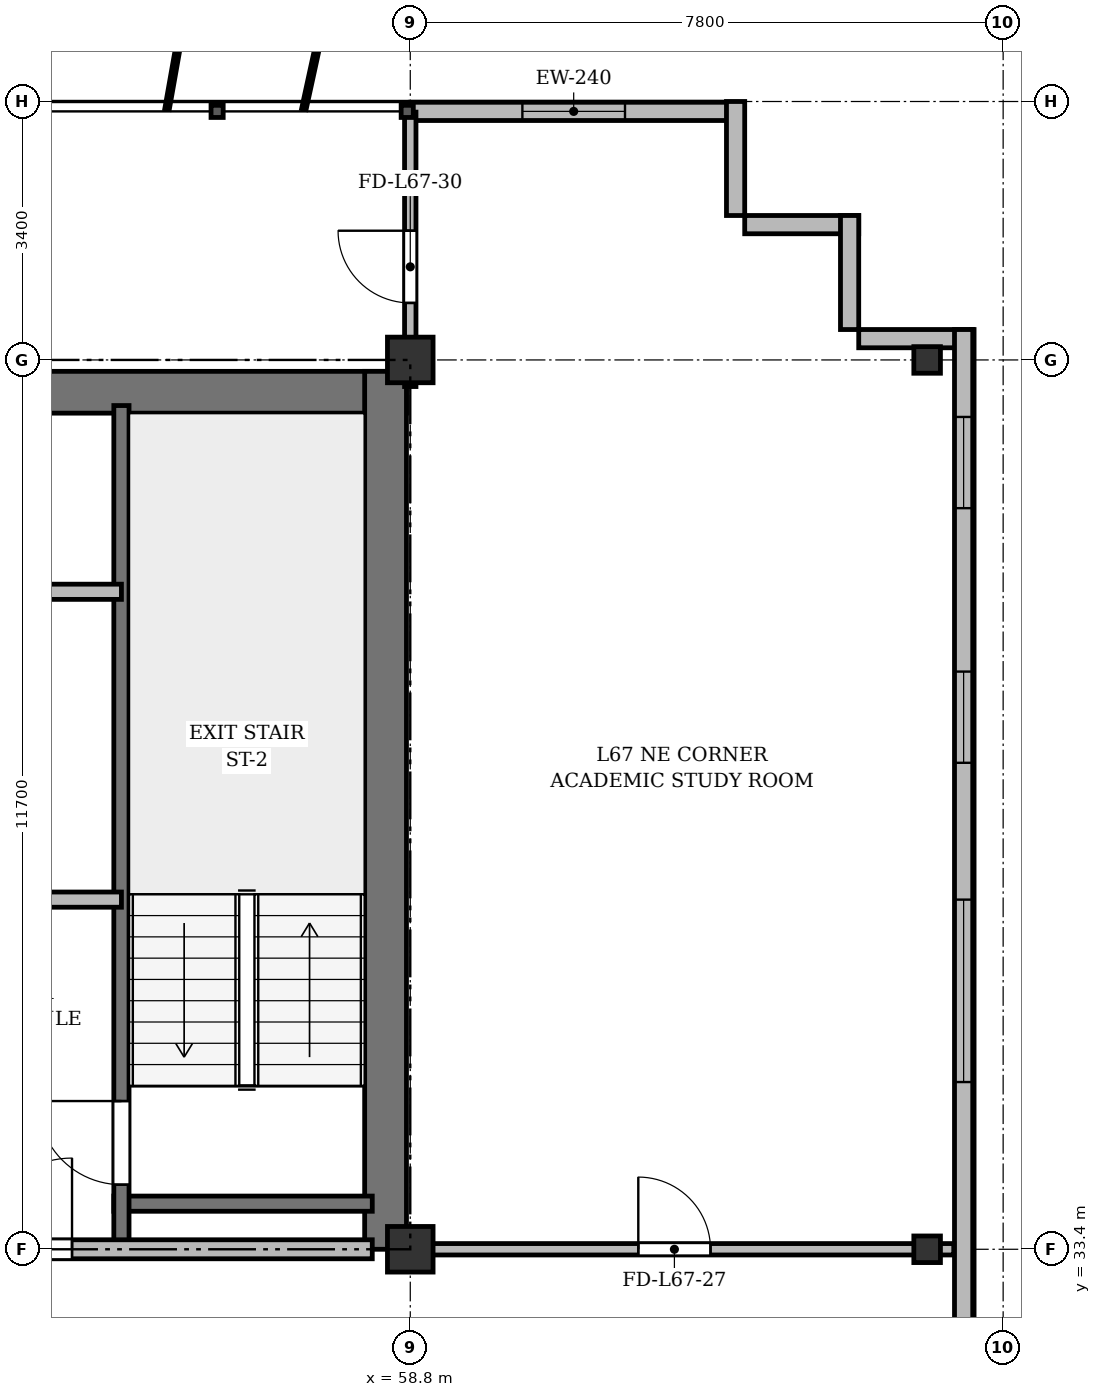
"""IFC4 building model, lengths in metres.
Left out: names, types, materials, properties, quantities, classifications, styles, units other than length and angle.
Written with IfcOpenShell. Run it as: python <this file> out.ifc"""

import sys

from ifc_helpers import new_model, si_unit, direction, frame, frame_2d, origin, origin_2d, place, context, subcontext, project, spatial, rectangle, i_section, extrude, source, transform, mapped, element, fill, save


model = new_model("IFC4")
c1 = context("Model", 3, precision=1e-05, world=origin(), true_north=direction((0.0, 1.0)))
c2 = subcontext(c1, "Body", "Model", "MODEL_VIEW")
j1 = project(units=[si_unit("LENGTHUNIT", "METRE"), si_unit("PLANEANGLEUNIT", "RADIAN")], contexts=[c1])
p1 = place(None, origin())
s1 = spatial("IfcSite", under=j1, at=p1, CompositionType="ELEMENT")
p2 = place(p1, origin())
s2 = spatial("IfcBuilding", under=s1, at=p2, CompositionType="ELEMENT")
p3 = place(p2, frame((0.0, 0.0, 259.5)))
s3 = spatial("IfcBuildingStorey", under=s2, at=p3, CompositionType="ELEMENT", Elevation=259.5)
m1 = source(origin(), c2, "Body", "SweptSolid", [
    extrude(rectangle(XDim=0.6, YDim=0.6, at=origin_2d()), origin(), (0.0, 0.0, 1.0), 3.6),
])
for number, where, z_axis, x_axis in (
    (1, (58.8, 33.4, 0.0), (0.0, 0.0, 1.0), (1.0, 0.0, 0.0)),
    (2, (58.8, 45.1, 0.0), (0.0, 0.0, 1.0), (1.0, 0.0, 0.0)),
):
    element("IfcColumn", number, at=place(p3, frame(where, z_axis=z_axis, x_axis=x_axis)), inside=s3, PredefinedType="COLUMN", context=c2, shape_type="MappedRepresentation", body=[
        mapped(m1, transform((0.0, 0.0, 0.0), x_axis=(1.0, 0.0, 0.0), y_axis=(0.0, 1.0, 0.0), z_axis=(0.0, 0.0, 1.0), scale=1.0)),
    ])
m2 = source(origin(), c2, "Body", "SweptSolid", [
    extrude(i_section(OverallWidth=0.35, OverallDepth=0.35, WebThickness=0.018, FlangeThickness=0.028, at=origin_2d()), origin(), (0.0, 0.0, 1.0), 3.6),
])
for number, where, z_axis, x_axis in (
    (3, (65.6, 33.4, 0.0), (0.0, 0.0, 1.0), (1.0, 0.0, 0.0)),
    (4, (65.6, 45.1, 0.0), (0.0, 0.0, 1.0), (1.0, 0.0, 0.0)),
):
    element("IfcColumn", number, at=place(p3, frame(where, z_axis=z_axis, x_axis=x_axis)), inside=s3, PredefinedType="COLUMN", context=c2, shape_type="MappedRepresentation", body=[
        mapped(m2, transform((0.0, 0.0, 0.0), x_axis=(1.0, 0.0, 0.0), y_axis=(0.0, 1.0, 0.0), z_axis=(0.0, 0.0, 1.0), scale=1.0)),
    ])
p4 = place(p3, frame((58.8, 48.37, 0.0), z_axis=(0.0, 0.0, 1.0), x_axis=(1.0, 0.0, 0.0)))
e5 = element("IfcWall", 5, at=p4, inside=s3, PredefinedType="SOLIDWALL", context=c2, shape_type="SweptSolid", body=[
    extrude(rectangle(XDim=4.3, YDim=0.24, at=frame_2d((2.15, 0.0))), origin(), (0.0, 0.0, 1.0), 3.37),
])
p5 = place(p4, frame((1.475, 0.0, 0.9)))
e6 = element("IfcOpeningElement", 6, at=p5, cuts=e5, PredefinedType="OPENING", context=c2, shape_type="SweptSolid", body=[
    extrude(rectangle(XDim=1.35, YDim=1.5, at=frame_2d((0.675, 0.75))), frame((0.0, 0.13, 0.0), z_axis=(0.0, -1.0, 0.0), x_axis=(1.0, 0.0, 0.0)), (0.0, 0.0, 1.0), 0.26),
])
for number, where, z_axis, x_axis in (
    (7, (63.08, 48.5, 0.0), (0.0, 0.0, 1.0), (0.0, -1.0, 0.0)),
    (8, (63.2, 46.88, 0.0), (0.0, 0.0, 1.0), (1.0, 0.0, 0.0)),
    (9, (64.58, 47.0, 0.0), (0.0, 0.0, 1.0), (0.0, -1.0, 0.0)),
    (10, (64.7, 45.38, 0.0), (0.0, 0.0, 1.0), (1.0, 0.0, 0.0)),
):
    element("IfcWall", number, at=place(p3, frame(where, z_axis=z_axis, x_axis=x_axis)), inside=s3, PredefinedType="SOLIDWALL", context=c2, shape_type="SweptSolid", body=[
        extrude(rectangle(XDim=1.5, YDim=0.24, at=frame_2d((0.75, 0.0))), origin(), (0.0, 0.0, 1.0), 3.37),
    ])
p6 = place(p3, frame((66.08, 45.5, 0.0), z_axis=(0.0, 0.0, 1.0), x_axis=(0.0, -1.0, 0.0)))
e11 = element("IfcWall", 11, at=p6, inside=s3, PredefinedType="SOLIDWALL", context=c2, shape_type="SweptSolid", body=[
    extrude(rectangle(XDim=39.0, YDim=0.24, at=frame_2d((19.5, 0.0))), origin(), (0.0, 0.0, 1.0), 3.37),
])
p7 = place(p6, frame((36.35, 0.0, 0.92)))
e12 = element("IfcOpeningElement", 12, at=p7, cuts=e11, PredefinedType="OPENING", context=c2, shape_type="SweptSolid", body=[
    extrude(rectangle(XDim=1.2, YDim=1.65, at=frame_2d((0.6, 0.825))), frame((0.0, 0.13, 0.0), z_axis=(0.0, -1.0, 0.0), x_axis=(1.0, 0.0, 0.0)), (0.0, 0.0, 1.0), 0.26),
])
p8 = place(p6, frame((32.9, 0.0, 0.92)))
e13 = element("IfcOpeningElement", 13, at=p8, cuts=e11, PredefinedType="OPENING", context=c2, shape_type="SweptSolid", body=[
    extrude(rectangle(XDim=2.4, YDim=2.1, at=frame_2d((1.2, 1.05))), frame((0.0, 0.13, 0.0), z_axis=(0.0, -1.0, 0.0), x_axis=(1.0, 0.0, 0.0)), (0.0, 0.0, 1.0), 0.26),
])
p9 = place(p6, frame((28.7, 0.0, 0.92)))
e14 = element("IfcOpeningElement", 14, at=p9, cuts=e11, PredefinedType="OPENING", context=c2, shape_type="SweptSolid", body=[
    extrude(rectangle(XDim=2.4, YDim=2.1, at=frame_2d((1.2, 1.05))), frame((0.0, 0.13, 0.0), z_axis=(0.0, -1.0, 0.0), x_axis=(1.0, 0.0, 0.0)), (0.0, 0.0, 1.0), 0.26),
])
p10 = place(p6, frame((21.5, 0.0, 0.92)))
e15 = element("IfcOpeningElement", 15, at=p10, cuts=e11, PredefinedType="OPENING", context=c2, shape_type="SweptSolid", body=[
    extrude(rectangle(XDim=2.4, YDim=2.1, at=frame_2d((1.2, 1.05))), frame((0.0, 0.13, 0.0), z_axis=(0.0, -1.0, 0.0), x_axis=(1.0, 0.0, 0.0)), (0.0, 0.0, 1.0), 0.26),
])
p11 = place(p6, frame((7.5, 0.0, 0.92)))
e16 = element("IfcOpeningElement", 16, at=p11, cuts=e11, PredefinedType="OPENING", context=c2, shape_type="SweptSolid", body=[
    extrude(rectangle(XDim=2.4, YDim=2.1, at=frame_2d((1.2, 1.05))), frame((0.0, 0.13, 0.0), z_axis=(0.0, -1.0, 0.0), x_axis=(1.0, 0.0, 0.0)), (0.0, 0.0, 1.0), 0.26),
])
p12 = place(p6, frame((4.5, 0.0, 0.92)))
e17 = element("IfcOpeningElement", 17, at=p12, cuts=e11, PredefinedType="OPENING", context=c2, shape_type="SweptSolid", body=[
    extrude(rectangle(XDim=1.2, YDim=1.65, at=frame_2d((0.6, 0.825))), frame((0.0, 0.13, 0.0), z_axis=(0.0, -1.0, 0.0), x_axis=(1.0, 0.0, 0.0)), (0.0, 0.0, 1.0), 0.26),
])
p13 = place(p6, frame((1.15, 0.0, 0.92)))
e18 = element("IfcOpeningElement", 18, at=p13, cuts=e11, PredefinedType="OPENING", context=c2, shape_type="SweptSolid", body=[
    extrude(rectangle(XDim=1.2, YDim=1.65, at=frame_2d((0.6, 0.825))), frame((0.0, 0.13, 0.0), z_axis=(0.0, -1.0, 0.0), x_axis=(1.0, 0.0, 0.0)), (0.0, 0.0, 1.0), 0.26),
])
p14 = place(p3, frame((15.65, 44.675, 0.0), z_axis=(0.0, 0.0, 1.0), x_axis=(1.0, 0.0, 0.0)))
e19 = element("IfcWall", 19, at=p14, inside=s3, PredefinedType="SHEAR", context=c2, shape_type="SweptSolid", body=[
    extrude(rectangle(XDim=43.1, YDim=0.55, at=frame_2d((21.55, 0.0))), origin(), (0.0, 0.0, 1.0), 3.37),
])
p15 = place(p3, frame((58.475, 33.4, 0.0), z_axis=(0.0, 0.0, 1.0), x_axis=(0.0, 1.0, 0.0)))
e20 = element("IfcWall", 20, at=p15, inside=s3, PredefinedType="SHEAR", context=c2, shape_type="SweptSolid", body=[
    extrude(rectangle(XDim=11.55, YDim=0.55, at=frame_2d((5.775, 0.0))), origin(), (0.0, 0.0, 1.0), 3.37),
])
p16 = place(p3, frame((54.9, 34.0, 0.0), z_axis=(0.0, 0.0, 1.0), x_axis=(1.0, 0.0, 0.0)))
e21 = element("IfcWall", 21, at=p16, inside=s3, PredefinedType="SHEAR", context=c2, shape_type="SweptSolid", body=[
    extrude(rectangle(XDim=3.4, YDim=0.2, at=frame_2d((1.7, 0.0))), origin(), (0.0, 0.0, 1.0), 3.37),
])
p17 = place(p3, frame((55.0, 33.4, 0.0), z_axis=(0.0, 0.0, 1.0), x_axis=(0.0, 1.0, 0.0)))
e22 = element("IfcWall", 22, at=p17, inside=s3, PredefinedType="SHEAR", context=c2, shape_type="SweptSolid", body=[
    extrude(rectangle(XDim=11.1, YDim=0.2, at=frame_2d((5.55, 0.0))), origin(), (0.0, 0.0, 1.0), 3.37),
])
p18 = place(p17, frame((0.85, 0.0, 0.0)))
e23 = element("IfcOpeningElement", 23, at=p18, cuts=e22, PredefinedType="OPENING", context=c2, shape_type="SweptSolid", body=[
    extrude(rectangle(XDim=1.1, YDim=2.15, at=frame_2d((0.55, 1.075))), frame((0.0, 0.11, 0.0), z_axis=(0.0, -1.0, 0.0), x_axis=(1.0, 0.0, 0.0)), (0.0, 0.0, 1.0), 0.22),
])
p19 = place(p3, frame((47.15, 42.05, 0.0), z_axis=(0.0, 0.0, 1.0), x_axis=(1.0, 0.0, 0.0)))
e24 = element("IfcWall", 24, at=p19, inside=s3, PredefinedType="SOLIDWALL", context=c2, shape_type="SweptSolid", body=[
    extrude(rectangle(XDim=7.85, YDim=0.2, at=frame_2d((3.925, 0.0))), origin(), (0.0, 0.0, 1.0), 2.87),
])
p20 = place(p19, frame((0.75, 0.0, 0.0)))
e25 = element("IfcOpeningElement", 25, at=p20, cuts=e24, PredefinedType="OPENING", context=c2, shape_type="SweptSolid", body=[
    extrude(rectangle(XDim=0.9, YDim=2.1, at=frame_2d((0.45, 1.05))), frame((0.0, 0.11, 0.0), z_axis=(0.0, -1.0, 0.0), x_axis=(1.0, 0.0, 0.0)), (0.0, 0.0, 1.0), 0.22),
])
p21 = place(p19, frame((3.85, 0.0, 0.0)))
e26 = element("IfcOpeningElement", 26, at=p21, cuts=e24, PredefinedType="OPENING", context=c2, shape_type="SweptSolid", body=[
    extrude(rectangle(XDim=0.9, YDim=2.1, at=frame_2d((0.45, 1.05))), frame((0.0, 0.11, 0.0), z_axis=(0.0, -1.0, 0.0), x_axis=(1.0, 0.0, 0.0)), (0.0, 0.0, 1.0), 0.22),
])
p22 = place(p3, frame((52.45, 38.0, 0.0), z_axis=(0.0, 0.0, 1.0), x_axis=(1.0, 0.0, 0.0)))
e27 = element("IfcWall", 27, at=p22, inside=s3, PredefinedType="PARTITIONING", context=c2, shape_type="SweptSolid", body=[
    extrude(rectangle(XDim=2.55, YDim=0.2, at=frame_2d((1.275, 0.0))), origin(), (0.0, 0.0, 1.0), 3.37),
])
p23 = place(p3, frame((47.15, 33.4, 0.0), z_axis=(0.0, 0.0, 1.0), x_axis=(1.0, 0.0, 0.0)))
e28 = element("IfcWall", 28, at=p23, inside=s3, PredefinedType="PARTITIONING", context=c2, shape_type="SweptSolid", body=[
    extrude(rectangle(XDim=11.15, YDim=0.25, at=frame_2d((5.575, 0.0))), origin(), (0.0, 0.0, 1.0), 2.92),
])
p24 = place(p23, frame((0.7, 0.0, 0.0)))
e29 = element("IfcOpeningElement", 29, at=p24, cuts=e28, PredefinedType="OPENING", context=c2, shape_type="SweptSolid", body=[
    extrude(rectangle(XDim=0.95, YDim=2.15, at=frame_2d((0.475, 1.075))), frame((0.0, 0.135, 0.0), z_axis=(0.0, -1.0, 0.0), x_axis=(1.0, 0.0, 0.0)), (0.0, 0.0, 1.0), 0.27),
])
p25 = place(p23, frame((6.0, 0.0, 0.0)))
e30 = element("IfcOpeningElement", 30, at=p25, cuts=e28, PredefinedType="OPENING", context=c2, shape_type="SweptSolid", body=[
    extrude(rectangle(XDim=1.2, YDim=2.15, at=frame_2d((0.6, 1.075))), frame((0.0, 0.135, 0.0), z_axis=(0.0, -1.0, 0.0), x_axis=(1.0, 0.0, 0.0)), (0.0, 0.0, 1.0), 0.27),
])
p26 = place(p3, frame((58.8, 33.4, 0.0), z_axis=(0.0, 0.0, 1.0), x_axis=(1.0, 0.0, 0.0)))
e31 = element("IfcWall", 31, at=p26, inside=s3, PredefinedType="PARTITIONING", context=c2, shape_type="SweptSolid", body=[
    extrude(rectangle(XDim=7.15, YDim=0.15, at=frame_2d((3.575, 0.0))), origin(), (0.0, 0.0, 1.0), 2.92),
])
p27 = place(p26, frame((3.0, 0.0, 0.0)))
e32 = element("IfcOpeningElement", 32, at=p27, cuts=e31, PredefinedType="OPENING", context=c2, shape_type="SweptSolid", body=[
    extrude(rectangle(XDim=0.95, YDim=2.15, at=frame_2d((0.475, 1.075))), frame((0.0, 0.085, 0.0), z_axis=(0.0, -1.0, 0.0), x_axis=(1.0, 0.0, 0.0)), (0.0, 0.0, 1.0), 0.17),
])
p28 = place(p3, frame((58.8, 44.75, 0.0), z_axis=(0.0, 0.0, 1.0), x_axis=(0.0, 1.0, 0.0)))
e33 = element("IfcWall", 33, at=p28, inside=s3, PredefinedType="PARTITIONING", context=c2, shape_type="SweptSolid", body=[
    extrude(rectangle(XDim=3.61, YDim=0.15, at=frame_2d((1.805, 0.0))), origin(), (0.0, 0.0, 1.0), 2.87),
])
p29 = place(p28, frame((1.1, 0.0, 0.0)))
e34 = element("IfcOpeningElement", 34, at=p29, cuts=e33, PredefinedType="OPENING", context=c2, shape_type="SweptSolid", body=[
    extrude(rectangle(XDim=0.95, YDim=2.15, at=frame_2d((0.475, 1.075))), frame((0.0, 0.085, 0.0), z_axis=(0.0, -1.0, 0.0), x_axis=(1.0, 0.0, 0.0)), (0.0, 0.0, 1.0), 0.17),
])
m3 = source(origin(), c2, "Body", "SweptSolid", [
    extrude(rectangle(XDim=1.35, YDim=1.5, at=frame_2d((0.675, 0.75))), frame((0.0, 0.03, 0.0), z_axis=(0.0, -1.0, 0.0), x_axis=(1.0, 0.0, 0.0)), (0.0, 0.0, 1.0), 0.06),
])
p30 = place(p5, origin())
e35 = element("IfcWindow", 35, at=p30, inside=s3, PartitioningType="SINGLE_PANEL", PredefinedType="WINDOW", context=c2, shape_type="MappedRepresentation", body=[
    mapped(m3, transform((0.0, 0.0, 0.0), x_axis=(1.0, 0.0, 0.0), y_axis=(0.0, 1.0, 0.0), z_axis=(0.0, 0.0, 1.0), scale=1.0)),
])
fill(e6, e35)
m4 = source(origin(), c2, "Body", "SweptSolid", [
    extrude(rectangle(XDim=2.4, YDim=2.1, at=frame_2d((1.2, 1.05))), frame((0.0, 0.03, 0.0), z_axis=(0.0, -1.0, 0.0), x_axis=(1.0, 0.0, 0.0)), (0.0, 0.0, 1.0), 0.06),
])
p31 = place(p11, origin())
e36 = element("IfcWindow", 36, at=p31, inside=s3, PartitioningType="SINGLE_PANEL", PredefinedType="WINDOW", context=c2, shape_type="MappedRepresentation", body=[
    mapped(m4, transform((0.0, 0.0, 0.0), x_axis=(1.0, 0.0, 0.0), y_axis=(0.0, 1.0, 0.0), z_axis=(0.0, 0.0, 1.0), scale=1.0)),
])
fill(e16, e36)
m5 = source(origin(), c2, "Body", "SweptSolid", [
    extrude(rectangle(XDim=1.2, YDim=1.65, at=frame_2d((0.6, 0.825))), frame((0.0, 0.03, 0.0), z_axis=(0.0, -1.0, 0.0), x_axis=(1.0, 0.0, 0.0)), (0.0, 0.0, 1.0), 0.06),
])
p32 = place(p12, origin())
e37 = element("IfcWindow", 37, at=p32, inside=s3, PartitioningType="SINGLE_PANEL", PredefinedType="WINDOW", context=c2, shape_type="MappedRepresentation", body=[
    mapped(m5, transform((0.0, 0.0, 0.0), x_axis=(1.0, 0.0, 0.0), y_axis=(0.0, 1.0, 0.0), z_axis=(0.0, 0.0, 1.0), scale=1.0)),
])
fill(e17, e37)
p33 = place(p13, origin())
e38 = element("IfcWindow", 38, at=p33, inside=s3, PartitioningType="SINGLE_PANEL", PredefinedType="WINDOW", context=c2, shape_type="MappedRepresentation", body=[
    mapped(m5, transform((0.0, 0.0, 0.0), x_axis=(1.0, 0.0, 0.0), y_axis=(0.0, 1.0, 0.0), z_axis=(0.0, 0.0, 1.0), scale=1.0)),
])
fill(e18, e38)
m6 = source(origin(), c2, "Body", "SweptSolid", [
    extrude(rectangle(XDim=1.1, YDim=2.15, at=frame_2d((0.55, 1.075))), frame((0.0, 0.025, 0.0), z_axis=(0.0, -1.0, 0.0), x_axis=(1.0, 0.0, 0.0)), (0.0, 0.0, 1.0), 0.05),
])
p34 = place(p18, origin())
e39 = element("IfcDoor", 39, at=p34, inside=s3, OperationType="SINGLE_SWING_RIGHT", PredefinedType="DOOR", context=c2, shape_type="MappedRepresentation", body=[
    mapped(m6, transform((0.0, 0.0, 0.0), x_axis=(1.0, 0.0, 0.0), y_axis=(0.0, 1.0, 0.0), z_axis=(0.0, 0.0, 1.0), scale=1.0)),
])
fill(e23, e39)
m7 = source(origin(), c2, "Body", "SweptSolid", [
    extrude(rectangle(XDim=1.2, YDim=2.15, at=frame_2d((0.6, 1.075))), frame((0.0, 0.025, 0.0), z_axis=(0.0, -1.0, 0.0), x_axis=(1.0, 0.0, 0.0)), (0.0, 0.0, 1.0), 0.05),
])
p35 = place(p25, origin())
e40 = element("IfcDoor", 40, at=p35, inside=s3, OperationType="SINGLE_SWING_RIGHT", PredefinedType="DOOR", context=c2, shape_type="MappedRepresentation", body=[
    mapped(m7, transform((0.0, 0.0, 0.0), x_axis=(1.0, 0.0, 0.0), y_axis=(0.0, 1.0, 0.0), z_axis=(0.0, 0.0, 1.0), scale=1.0)),
])
fill(e30, e40)
m8 = source(origin(), c2, "Body", "SweptSolid", [
    extrude(rectangle(XDim=0.95, YDim=2.15, at=frame_2d((0.475, 1.075))), frame((0.0, 0.025, 0.0), z_axis=(0.0, -1.0, 0.0), x_axis=(1.0, 0.0, 0.0)), (0.0, 0.0, 1.0), 0.05),
])
p36 = place(p27, origin())
e41 = element("IfcDoor", 41, at=p36, inside=s3, OperationType="SINGLE_SWING_LEFT", PredefinedType="DOOR", context=c2, shape_type="MappedRepresentation", body=[
    mapped(m8, transform((0.0, 0.0, 0.0), x_axis=(1.0, 0.0, 0.0), y_axis=(0.0, 1.0, 0.0), z_axis=(0.0, 0.0, 1.0), scale=1.0)),
])
fill(e32, e41)
p37 = place(p29, origin())
e42 = element("IfcDoor", 42, at=p37, inside=s3, OperationType="SINGLE_SWING_RIGHT", PredefinedType="DOOR", context=c2, shape_type="MappedRepresentation", body=[
    mapped(m8, transform((0.0, 0.0, 0.0), x_axis=(1.0, 0.0, 0.0), y_axis=(0.0, 1.0, 0.0), z_axis=(0.0, 0.0, 1.0), scale=1.0)),
])
fill(e34, e42)
save(model, sys.argv[1])
